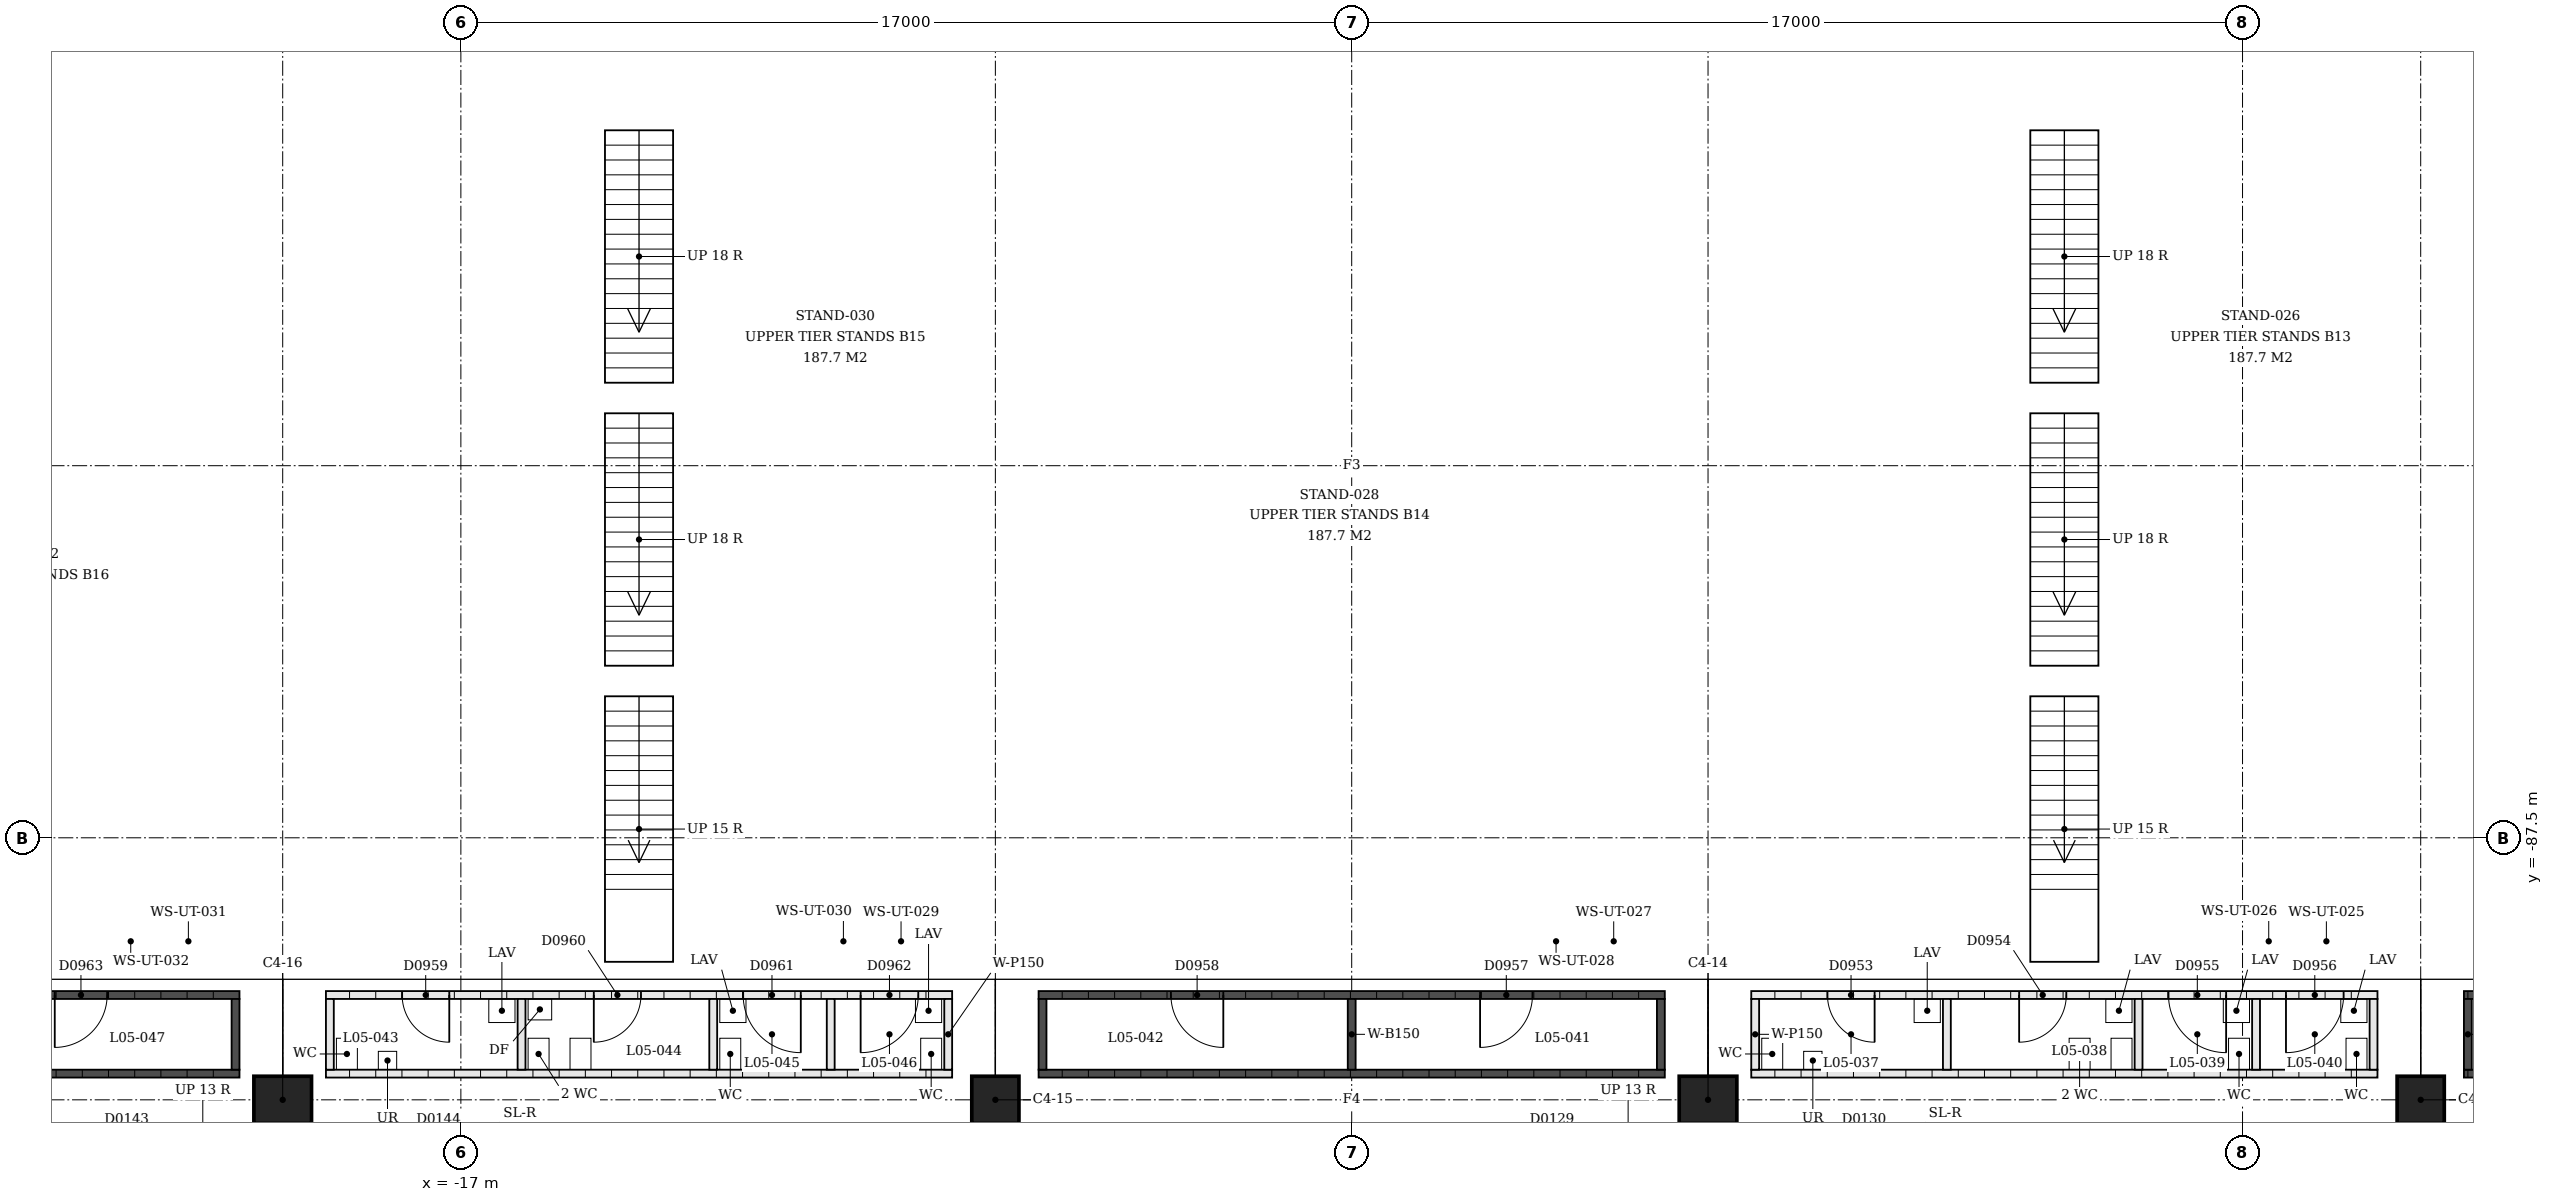
"""IFC4 building model, lengths in metres.
Left out: names, types, materials, properties, quantities, classifications, styles, units other than length and angle.
Written with IfcOpenShell. Run it as: python <this file> out.ifc"""

import sys

from ifc_helpers import new_model, si_unit, direction, frame, frame_2d, origin, origin_2d, place, context, subcontext, project, spatial, rectangle, extrude, element, fill, save


model = new_model("IFC4")
c1 = context("Model", 3, precision=1e-05, world=origin(), true_north=direction((0.0, 1.0)))
c2 = subcontext(c1, "Body", "Model", "MODEL_VIEW")
j1 = project(units=[si_unit("LENGTHUNIT", "METRE"), si_unit("PLANEANGLEUNIT", "RADIAN")], contexts=[c1])
p1 = place(None, origin())
s1 = spatial("IfcSite", under=j1, at=p1, CompositionType="ELEMENT")
p2 = place(p1, origin())
s2 = spatial("IfcBuilding", under=s1, at=p2, CompositionType="ELEMENT")
p3 = place(p2, frame((0.0, 0.0, 22.5)))
s3 = spatial("IfcBuildingStorey", under=s2, at=p3, CompositionType="ELEMENT", Elevation=22.5)
p4 = place(p3, frame((20.4, -92.5, 0.0), z_axis=(0.0, 0.0, 1.0), x_axis=(1.0, 0.0, 0.0)))
e1 = element("IfcColumn", 1, at=p4, inside=s3, PredefinedType="COLUMN", context=c2, shape_type="SweptSolid", body=[
    extrude(rectangle(XDim=0.9, YDim=0.9, at=origin_2d()), origin(), (0.0, 0.0, 1.0), 6.5),
])
p5 = place(p3, frame((6.8, -92.5, 0.0), z_axis=(0.0, 0.0, 1.0), x_axis=(1.0, 0.0, 0.0)))
e2 = element("IfcColumn", 2, at=p5, inside=s3, PredefinedType="COLUMN", context=c2, shape_type="SweptSolid", body=[
    extrude(rectangle(XDim=1.1, YDim=0.9, at=origin_2d()), origin(), (0.0, 0.0, 1.0), 6.5),
])
p6 = place(p3, frame((-6.8, -92.5, 0.0), z_axis=(0.0, 0.0, 1.0), x_axis=(1.0, 0.0, 0.0)))
e3 = element("IfcColumn", 3, at=p6, inside=s3, PredefinedType="COLUMN", context=c2, shape_type="SweptSolid", body=[
    extrude(rectangle(XDim=0.9, YDim=0.9, at=origin_2d()), origin(), (0.0, 0.0, 1.0), 6.5),
])
p7 = place(p3, frame((-20.4, -92.5, 0.0), z_axis=(0.0, 0.0, 1.0), x_axis=(1.0, 0.0, 0.0)))
e4 = element("IfcColumn", 4, at=p7, inside=s3, PredefinedType="COLUMN", context=c2, shape_type="SweptSolid", body=[
    extrude(rectangle(XDim=1.1, YDim=0.9, at=origin_2d()), origin(), (0.0, 0.0, 1.0), 6.5),
])
p8 = place(p3, frame((33.175, -90.5, 0.0), z_axis=(0.0, 0.0, 1.0), x_axis=(-1.0, 0.0, 0.0)))
e5 = element("IfcWall", 5, at=p8, inside=s3, PredefinedType="SOLIDWALL", context=c2, shape_type="SweptSolid", body=[
    extrude(rectangle(XDim=11.95, YDim=0.15, at=frame_2d((5.975, 0.0))), origin(), (0.0, 0.0, 1.0), 3.0),
])
p9 = place(p8, frame((2.525, 0.0, 0.0)))
e6 = element("IfcOpeningElement", 6, at=p9, cuts=e5, PredefinedType="OPENING", context=c2, shape_type="SweptSolid", body=[
    extrude(rectangle(XDim=1.0, YDim=2.1, at=frame_2d((0.5, 1.05))), frame((0.0, 0.075, 0.0), z_axis=(0.0, -1.0, 0.0), x_axis=(1.0, 0.0, 0.0)), (0.0, 0.0, 1.0), 0.15),
])
p10 = place(p8, frame((8.425, 0.0, 0.0)))
e7 = element("IfcOpeningElement", 7, at=p10, cuts=e5, PredefinedType="OPENING", context=c2, shape_type="SweptSolid", body=[
    extrude(rectangle(XDim=1.0, YDim=2.1, at=frame_2d((0.5, 1.05))), frame((0.0, 0.075, 0.0), z_axis=(0.0, -1.0, 0.0), x_axis=(1.0, 0.0, 0.0)), (0.0, 0.0, 1.0), 0.15),
])
p11 = place(p3, frame((33.175, -92.0, 0.0), z_axis=(0.0, 0.0, 1.0), x_axis=(-1.0, 0.0, 0.0)))
e8 = element("IfcWall", 8, at=p11, inside=s3, PredefinedType="SOLIDWALL", context=c2, shape_type="SweptSolid", body=[
    extrude(rectangle(XDim=11.95, YDim=0.15, at=frame_2d((5.975, 0.0))), origin(), (0.0, 0.0, 1.0), 3.0),
])
p12 = place(p3, frame((21.3, -90.575, 0.0), z_axis=(0.0, 0.0, 1.0), x_axis=(0.0, -1.0, 0.0)))
e9 = element("IfcWall", 9, at=p12, inside=s3, PredefinedType="SOLIDWALL", context=c2, shape_type="SweptSolid", body=[
    extrude(rectangle(XDim=1.35, YDim=0.15, at=frame_2d((0.675, 0.0))), origin(), (0.0, 0.0, 1.0), 3.0),
])
p13 = place(p3, frame((7.625, -90.5, 0.0), z_axis=(0.0, 0.0, 1.0), x_axis=(1.0, 0.0, 0.0)))
e10 = element("IfcWall", 10, at=p13, inside=s3, PredefinedType="PARTITIONING", context=c2, shape_type="SweptSolid", body=[
    extrude(rectangle(XDim=11.95, YDim=0.15, at=frame_2d((5.975, 0.0))), origin(), (0.0, 0.0, 1.0), 3.0),
])
p14 = place(p13, frame((1.454, 0.0, 0.0)))
e11 = element("IfcOpeningElement", 11, at=p14, cuts=e10, PredefinedType="OPENING", context=c2, shape_type="SweptSolid", body=[
    extrude(rectangle(XDim=0.9, YDim=2.1, at=frame_2d((0.45, 1.05))), frame((0.0, 0.075, 0.0), z_axis=(0.0, -1.0, 0.0), x_axis=(1.0, 0.0, 0.0)), (0.0, 0.0, 1.0), 0.15),
])
p15 = place(p13, frame((5.112, 0.0, 0.0)))
e12 = element("IfcOpeningElement", 12, at=p15, cuts=e10, PredefinedType="OPENING", context=c2, shape_type="SweptSolid", body=[
    extrude(rectangle(XDim=0.9, YDim=2.1, at=frame_2d((0.45, 1.05))), frame((0.0, 0.075, 0.0), z_axis=(0.0, -1.0, 0.0), x_axis=(1.0, 0.0, 0.0)), (0.0, 0.0, 1.0), 0.15),
])
p16 = place(p13, frame((7.962, 0.0, 0.0)))
e13 = element("IfcOpeningElement", 13, at=p16, cuts=e10, PredefinedType="OPENING", context=c2, shape_type="SweptSolid", body=[
    extrude(rectangle(XDim=1.1, YDim=2.1, at=frame_2d((0.55, 1.05))), frame((0.0, 0.075, 0.0), z_axis=(0.0, -1.0, 0.0), x_axis=(1.0, 0.0, 0.0)), (0.0, 0.0, 1.0), 0.15),
])
p17 = place(p13, frame((10.204, 0.0, 0.0)))
e14 = element("IfcOpeningElement", 14, at=p17, cuts=e10, PredefinedType="OPENING", context=c2, shape_type="SweptSolid", body=[
    extrude(rectangle(XDim=1.1, YDim=2.1, at=frame_2d((0.55, 1.05))), frame((0.0, 0.075, 0.0), z_axis=(0.0, -1.0, 0.0), x_axis=(1.0, 0.0, 0.0)), (0.0, 0.0, 1.0), 0.15),
])
p18 = place(p3, frame((7.625, -92.0, 0.0), z_axis=(0.0, 0.0, 1.0), x_axis=(1.0, 0.0, 0.0)))
e15 = element("IfcWall", 15, at=p18, inside=s3, PredefinedType="PARTITIONING", context=c2, shape_type="SweptSolid", body=[
    extrude(rectangle(XDim=11.95, YDim=0.15, at=frame_2d((5.975, 0.0))), origin(), (0.0, 0.0, 1.0), 3.0),
])
for number, where, z_axis, x_axis in (
    (16, (7.7, -90.575, 0.0), (0.0, 0.0, 1.0), (0.0, -1.0, 0.0)),
    (17, (11.358, -90.575, 0.0), (0.0, 0.0, 1.0), (0.0, -1.0, 0.0)),
    (18, (15.016, -90.575, 0.0), (0.0, 0.0, 1.0), (0.0, -1.0, 0.0)),
    (19, (17.258, -90.575, 0.0), (0.0, 0.0, 1.0), (0.0, -1.0, 0.0)),
    (20, (19.5, -90.575, 0.0), (0.0, 0.0, 1.0), (0.0, -1.0, 0.0)),
):
    element("IfcWall", number, at=place(p3, frame(where, z_axis=z_axis, x_axis=x_axis)), inside=s3, PredefinedType="PARTITIONING", context=c2, shape_type="SweptSolid", body=[
        extrude(rectangle(XDim=1.35, YDim=0.15, at=frame_2d((0.675, 0.0))), origin(), (0.0, 0.0, 1.0), 3.0),
    ])
p19 = place(p3, frame((5.975, -90.5, 0.0), z_axis=(0.0, 0.0, 1.0), x_axis=(-1.0, 0.0, 0.0)))
e21 = element("IfcWall", 21, at=p19, inside=s3, PredefinedType="SOLIDWALL", context=c2, shape_type="SweptSolid", body=[
    extrude(rectangle(XDim=11.95, YDim=0.15, at=frame_2d((5.975, 0.0))), origin(), (0.0, 0.0, 1.0), 3.0),
])
p20 = place(p19, frame((2.525, 0.0, 0.0)))
e22 = element("IfcOpeningElement", 22, at=p20, cuts=e21, PredefinedType="OPENING", context=c2, shape_type="SweptSolid", body=[
    extrude(rectangle(XDim=1.0, YDim=2.1, at=frame_2d((0.5, 1.05))), frame((0.0, 0.075, 0.0), z_axis=(0.0, -1.0, 0.0), x_axis=(1.0, 0.0, 0.0)), (0.0, 0.0, 1.0), 0.15),
])
p21 = place(p19, frame((8.425, 0.0, 0.0)))
e23 = element("IfcOpeningElement", 23, at=p21, cuts=e21, PredefinedType="OPENING", context=c2, shape_type="SweptSolid", body=[
    extrude(rectangle(XDim=1.0, YDim=2.1, at=frame_2d((0.5, 1.05))), frame((0.0, 0.075, 0.0), z_axis=(0.0, -1.0, 0.0), x_axis=(1.0, 0.0, 0.0)), (0.0, 0.0, 1.0), 0.15),
])
p22 = place(p3, frame((5.975, -92.0, 0.0), z_axis=(0.0, 0.0, 1.0), x_axis=(-1.0, 0.0, 0.0)))
e24 = element("IfcWall", 24, at=p22, inside=s3, PredefinedType="SOLIDWALL", context=c2, shape_type="SweptSolid", body=[
    extrude(rectangle(XDim=11.95, YDim=0.15, at=frame_2d((5.975, 0.0))), origin(), (0.0, 0.0, 1.0), 3.0),
])
for number, where, z_axis, x_axis in (
    (25, (5.9, -90.575, 0.0), (0.0, 0.0, 1.0), (0.0, -1.0, 0.0)),
    (26, (0.0, -90.575, 0.0), (0.0, 0.0, 1.0), (0.0, -1.0, 0.0)),
    (27, (-5.9, -90.575, 0.0), (0.0, 0.0, 1.0), (0.0, -1.0, 0.0)),
):
    element("IfcWall", number, at=place(p3, frame(where, z_axis=z_axis, x_axis=x_axis)), inside=s3, PredefinedType="SOLIDWALL", context=c2, shape_type="SweptSolid", body=[
        extrude(rectangle(XDim=1.35, YDim=0.15, at=frame_2d((0.675, 0.0))), origin(), (0.0, 0.0, 1.0), 3.0),
    ])
p23 = place(p3, frame((-19.575, -90.5, 0.0), z_axis=(0.0, 0.0, 1.0), x_axis=(1.0, 0.0, 0.0)))
e28 = element("IfcWall", 28, at=p23, inside=s3, PredefinedType="PARTITIONING", context=c2, shape_type="SweptSolid", body=[
    extrude(rectangle(XDim=11.95, YDim=0.15, at=frame_2d((5.975, 0.0))), origin(), (0.0, 0.0, 1.0), 3.0),
])
p24 = place(p23, frame((1.454, 0.0, 0.0)))
e29 = element("IfcOpeningElement", 29, at=p24, cuts=e28, PredefinedType="OPENING", context=c2, shape_type="SweptSolid", body=[
    extrude(rectangle(XDim=0.9, YDim=2.1, at=frame_2d((0.45, 1.05))), frame((0.0, 0.075, 0.0), z_axis=(0.0, -1.0, 0.0), x_axis=(1.0, 0.0, 0.0)), (0.0, 0.0, 1.0), 0.15),
])
p25 = place(p23, frame((5.112, 0.0, 0.0)))
e30 = element("IfcOpeningElement", 30, at=p25, cuts=e28, PredefinedType="OPENING", context=c2, shape_type="SweptSolid", body=[
    extrude(rectangle(XDim=0.9, YDim=2.1, at=frame_2d((0.45, 1.05))), frame((0.0, 0.075, 0.0), z_axis=(0.0, -1.0, 0.0), x_axis=(1.0, 0.0, 0.0)), (0.0, 0.0, 1.0), 0.15),
])
p26 = place(p23, frame((7.962, 0.0, 0.0)))
e31 = element("IfcOpeningElement", 31, at=p26, cuts=e28, PredefinedType="OPENING", context=c2, shape_type="SweptSolid", body=[
    extrude(rectangle(XDim=1.1, YDim=2.1, at=frame_2d((0.55, 1.05))), frame((0.0, 0.075, 0.0), z_axis=(0.0, -1.0, 0.0), x_axis=(1.0, 0.0, 0.0)), (0.0, 0.0, 1.0), 0.15),
])
p27 = place(p23, frame((10.204, 0.0, 0.0)))
e32 = element("IfcOpeningElement", 32, at=p27, cuts=e28, PredefinedType="OPENING", context=c2, shape_type="SweptSolid", body=[
    extrude(rectangle(XDim=1.1, YDim=2.1, at=frame_2d((0.55, 1.05))), frame((0.0, 0.075, 0.0), z_axis=(0.0, -1.0, 0.0), x_axis=(1.0, 0.0, 0.0)), (0.0, 0.0, 1.0), 0.15),
])
p28 = place(p3, frame((-19.575, -92.0, 0.0), z_axis=(0.0, 0.0, 1.0), x_axis=(1.0, 0.0, 0.0)))
e33 = element("IfcWall", 33, at=p28, inside=s3, PredefinedType="PARTITIONING", context=c2, shape_type="SweptSolid", body=[
    extrude(rectangle(XDim=11.95, YDim=0.15, at=frame_2d((5.975, 0.0))), origin(), (0.0, 0.0, 1.0), 3.0),
])
for number, where, z_axis, x_axis in (
    (34, (-19.5, -90.575, 0.0), (0.0, 0.0, 1.0), (0.0, -1.0, 0.0)),
    (35, (-15.842, -90.575, 0.0), (0.0, 0.0, 1.0), (0.0, -1.0, 0.0)),
    (36, (-12.184, -90.575, 0.0), (0.0, 0.0, 1.0), (0.0, -1.0, 0.0)),
    (37, (-9.942, -90.575, 0.0), (0.0, 0.0, 1.0), (0.0, -1.0, 0.0)),
    (38, (-7.7, -90.575, 0.0), (0.0, 0.0, 1.0), (0.0, -1.0, 0.0)),
):
    element("IfcWall", number, at=place(p3, frame(where, z_axis=z_axis, x_axis=x_axis)), inside=s3, PredefinedType="PARTITIONING", context=c2, shape_type="SweptSolid", body=[
        extrude(rectangle(XDim=1.35, YDim=0.15, at=frame_2d((0.675, 0.0))), origin(), (0.0, 0.0, 1.0), 3.0),
    ])
p29 = place(p3, frame((-21.225, -90.5, 0.0), z_axis=(0.0, 0.0, 1.0), x_axis=(-1.0, 0.0, 0.0)))
e39 = element("IfcWall", 39, at=p29, inside=s3, PredefinedType="SOLIDWALL", context=c2, shape_type="SweptSolid", body=[
    extrude(rectangle(XDim=11.95, YDim=0.15, at=frame_2d((5.975, 0.0))), origin(), (0.0, 0.0, 1.0), 3.0),
])
p30 = place(p29, frame((2.525, 0.0, 0.0)))
e40 = element("IfcOpeningElement", 40, at=p30, cuts=e39, PredefinedType="OPENING", context=c2, shape_type="SweptSolid", body=[
    extrude(rectangle(XDim=1.0, YDim=2.1, at=frame_2d((0.5, 1.05))), frame((0.0, 0.075, 0.0), z_axis=(0.0, -1.0, 0.0), x_axis=(1.0, 0.0, 0.0)), (0.0, 0.0, 1.0), 0.15),
])
p31 = place(p29, frame((8.425, 0.0, 0.0)))
e41 = element("IfcOpeningElement", 41, at=p31, cuts=e39, PredefinedType="OPENING", context=c2, shape_type="SweptSolid", body=[
    extrude(rectangle(XDim=1.0, YDim=2.1, at=frame_2d((0.5, 1.05))), frame((0.0, 0.075, 0.0), z_axis=(0.0, -1.0, 0.0), x_axis=(1.0, 0.0, 0.0)), (0.0, 0.0, 1.0), 0.15),
])
p32 = place(p3, frame((-21.225, -92.0, 0.0), z_axis=(0.0, 0.0, 1.0), x_axis=(-1.0, 0.0, 0.0)))
e42 = element("IfcWall", 42, at=p32, inside=s3, PredefinedType="SOLIDWALL", context=c2, shape_type="SweptSolid", body=[
    extrude(rectangle(XDim=11.95, YDim=0.15, at=frame_2d((5.975, 0.0))), origin(), (0.0, 0.0, 1.0), 3.0),
])
p33 = place(p3, frame((-21.3, -90.575, 0.0), z_axis=(0.0, 0.0, 1.0), x_axis=(0.0, -1.0, 0.0)))
e43 = element("IfcWall", 43, at=p33, inside=s3, PredefinedType="SOLIDWALL", context=c2, shape_type="SweptSolid", body=[
    extrude(rectangle(XDim=1.35, YDim=0.15, at=frame_2d((0.675, 0.0))), origin(), (0.0, 0.0, 1.0), 3.0),
])
p34 = place(p14, origin())
e44 = element("IfcDoor", 44, at=p34, inside=s3, OperationType="SINGLE_SWING_RIGHT", PredefinedType="DOOR", context=c2, shape_type="SweptSolid", body=[
    extrude(rectangle(XDim=0.9, YDim=2.1, at=frame_2d((0.45, 1.05))), frame((0.0, 0.025, 0.0), z_axis=(0.0, -1.0, 0.0), x_axis=(1.0, 0.0, 0.0)), (0.0, 0.0, 1.0), 0.05),
])
fill(e11, e44)
p35 = place(p15, origin())
e45 = element("IfcDoor", 45, at=p35, inside=s3, OperationType="SINGLE_SWING_LEFT", PredefinedType="DOOR", context=c2, shape_type="SweptSolid", body=[
    extrude(rectangle(XDim=0.9, YDim=2.1, at=frame_2d((0.45, 1.05))), frame((0.0, 0.025, 0.0), z_axis=(0.0, -1.0, 0.0), x_axis=(1.0, 0.0, 0.0)), (0.0, 0.0, 1.0), 0.05),
])
fill(e12, e45)
p36 = place(p16, origin())
e46 = element("IfcDoor", 46, at=p36, inside=s3, OperationType="SINGLE_SWING_RIGHT", PredefinedType="DOOR", context=c2, shape_type="SweptSolid", body=[
    extrude(rectangle(XDim=1.1, YDim=2.1, at=frame_2d((0.55, 1.05))), frame((0.0, 0.025, 0.0), z_axis=(0.0, -1.0, 0.0), x_axis=(1.0, 0.0, 0.0)), (0.0, 0.0, 1.0), 0.05),
])
fill(e13, e46)
p37 = place(p17, origin())
e47 = element("IfcDoor", 47, at=p37, inside=s3, OperationType="SINGLE_SWING_LEFT", PredefinedType="DOOR", context=c2, shape_type="SweptSolid", body=[
    extrude(rectangle(XDim=1.1, YDim=2.1, at=frame_2d((0.55, 1.05))), frame((0.0, 0.025, 0.0), z_axis=(0.0, -1.0, 0.0), x_axis=(1.0, 0.0, 0.0)), (0.0, 0.0, 1.0), 0.05),
])
fill(e14, e47)
p38 = place(p20, origin())
e48 = element("IfcDoor", 48, at=p38, inside=s3, OperationType="SINGLE_SWING_LEFT", PredefinedType="DOOR", context=c2, shape_type="SweptSolid", body=[
    extrude(rectangle(XDim=1.0, YDim=2.1, at=frame_2d((0.5, 1.05))), frame((0.0, 0.025, 0.0), z_axis=(0.0, -1.0, 0.0), x_axis=(1.0, 0.0, 0.0)), (0.0, 0.0, 1.0), 0.05),
])
fill(e22, e48)
p39 = place(p21, origin())
e49 = element("IfcDoor", 49, at=p39, inside=s3, OperationType="SINGLE_SWING_RIGHT", PredefinedType="DOOR", context=c2, shape_type="SweptSolid", body=[
    extrude(rectangle(XDim=1.0, YDim=2.1, at=frame_2d((0.5, 1.05))), frame((0.0, 0.025, 0.0), z_axis=(0.0, -1.0, 0.0), x_axis=(1.0, 0.0, 0.0)), (0.0, 0.0, 1.0), 0.05),
])
fill(e23, e49)
p40 = place(p24, origin())
e50 = element("IfcDoor", 50, at=p40, inside=s3, OperationType="SINGLE_SWING_RIGHT", PredefinedType="DOOR", context=c2, shape_type="SweptSolid", body=[
    extrude(rectangle(XDim=0.9, YDim=2.1, at=frame_2d((0.45, 1.05))), frame((0.0, 0.025, 0.0), z_axis=(0.0, -1.0, 0.0), x_axis=(1.0, 0.0, 0.0)), (0.0, 0.0, 1.0), 0.05),
])
fill(e29, e50)
p41 = place(p25, origin())
e51 = element("IfcDoor", 51, at=p41, inside=s3, OperationType="SINGLE_SWING_LEFT", PredefinedType="DOOR", context=c2, shape_type="SweptSolid", body=[
    extrude(rectangle(XDim=0.9, YDim=2.1, at=frame_2d((0.45, 1.05))), frame((0.0, 0.025, 0.0), z_axis=(0.0, -1.0, 0.0), x_axis=(1.0, 0.0, 0.0)), (0.0, 0.0, 1.0), 0.05),
])
fill(e30, e51)
p42 = place(p26, origin())
e52 = element("IfcDoor", 52, at=p42, inside=s3, OperationType="SINGLE_SWING_RIGHT", PredefinedType="DOOR", context=c2, shape_type="SweptSolid", body=[
    extrude(rectangle(XDim=1.1, YDim=2.1, at=frame_2d((0.55, 1.05))), frame((0.0, 0.025, 0.0), z_axis=(0.0, -1.0, 0.0), x_axis=(1.0, 0.0, 0.0)), (0.0, 0.0, 1.0), 0.05),
])
fill(e31, e52)
p43 = place(p27, origin())
e53 = element("IfcDoor", 53, at=p43, inside=s3, OperationType="SINGLE_SWING_LEFT", PredefinedType="DOOR", context=c2, shape_type="SweptSolid", body=[
    extrude(rectangle(XDim=1.1, YDim=2.1, at=frame_2d((0.55, 1.05))), frame((0.0, 0.025, 0.0), z_axis=(0.0, -1.0, 0.0), x_axis=(1.0, 0.0, 0.0)), (0.0, 0.0, 1.0), 0.05),
])
fill(e32, e53)
p44 = place(p30, origin())
e54 = element("IfcDoor", 54, at=p44, inside=s3, OperationType="SINGLE_SWING_LEFT", PredefinedType="DOOR", context=c2, shape_type="SweptSolid", body=[
    extrude(rectangle(XDim=1.0, YDim=2.1, at=frame_2d((0.5, 1.05))), frame((0.0, 0.025, 0.0), z_axis=(0.0, -1.0, 0.0), x_axis=(1.0, 0.0, 0.0)), (0.0, 0.0, 1.0), 0.05),
])
fill(e40, e54)
save(model, sys.argv[1])
